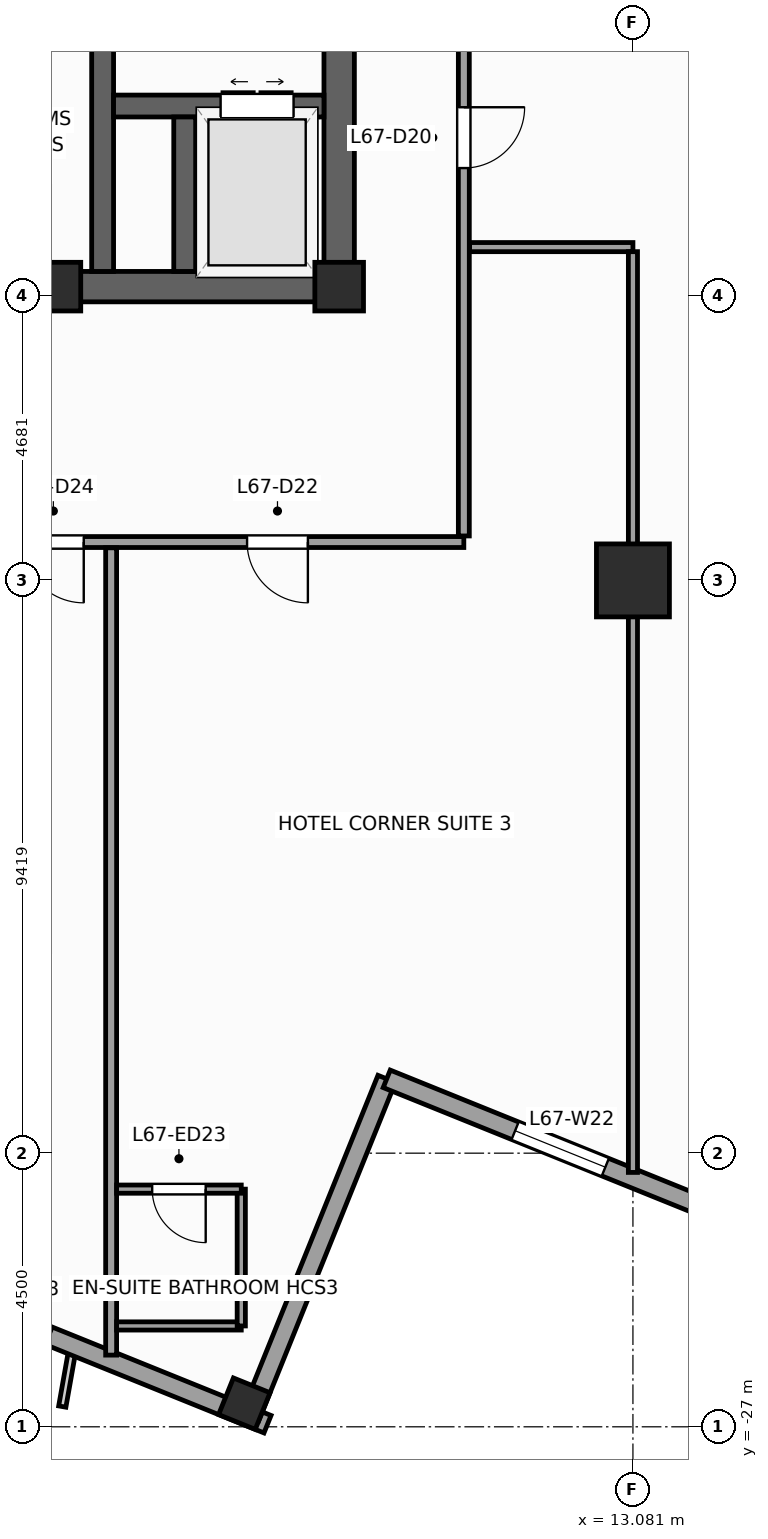
"""IFC4 building model, lengths in metres.
Left out: names, types, materials, properties, quantities, classifications, styles, units other than length and angle.
Written with IfcOpenShell. Run it as: python <this file> out.ifc"""

import sys

from ifc_helpers import new_model, si_unit, direction, frame, frame_2d, origin, origin_2d, place, context, subcontext, project, spatial, rectangle, extrude, source, transform, mapped, element, fill, save


model = new_model("IFC4")
c1 = context("Model", 3, precision=1e-05, world=origin(), true_north=direction((0.0, 1.0)))
c2 = subcontext(c1, "Body", "Model", "MODEL_VIEW")
j1 = project(units=[si_unit("LENGTHUNIT", "METRE"), si_unit("PLANEANGLEUNIT", "RADIAN")], contexts=[c1])
p1 = place(None, origin())
s1 = spatial("IfcSite", under=j1, at=p1, CompositionType="ELEMENT")
p2 = place(p1, origin())
s2 = spatial("IfcBuilding", under=s1, at=p2, CompositionType="ELEMENT")
p3 = place(p2, frame((0.0, 0.0, 276.0)))
s3 = spatial("IfcBuildingStorey", under=s2, at=p3, CompositionType="ELEMENT", Elevation=276.0)
p4 = place(p3, frame((-8.5, -8.25, 0.0), z_axis=(0.0, 0.0, 1.0), x_axis=(1.0, 0.0, 0.0)))
e1 = element("IfcWall", 1, at=p4, inside=s3, PredefinedType="SHEAR", context=c2, shape_type="SweptSolid", body=[
    extrude(rectangle(XDim=17.0, YDim=0.5, at=frame_2d((8.5, 0.0))), origin(), (0.0, 0.0, 1.0), 3.6),
])
p5 = place(p4, frame((7.85, 0.0, 0.0)))
e2 = element("IfcOpeningElement", 2, at=p5, cuts=e1, PredefinedType="OPENING", context=c2, shape_type="SweptSolid", body=[
    extrude(rectangle(XDim=1.3, YDim=2.2, at=frame_2d((0.65, 1.1))), frame((0.0, 0.26, 0.0), z_axis=(0.0, -1.0, 0.0), x_axis=(1.0, 0.0, 0.0)), (0.0, 0.0, 1.0), 0.52),
])
p6 = place(p3, frame((8.25, -8.0, 0.0), z_axis=(0.0, 0.0, 1.0), x_axis=(0.0, 1.0, 0.0)))
e3 = element("IfcWall", 3, at=p6, inside=s3, PredefinedType="SHEAR", context=c2, shape_type="SweptSolid", body=[
    extrude(rectangle(XDim=16.0, YDim=0.5, at=frame_2d((8.0, 0.0))), origin(), (0.0, 0.0, 1.0), 3.6),
])
p7 = place(p6, frame((4.69, 0.0, 0.0)))
e4 = element("IfcOpeningElement", 4, at=p7, cuts=e3, PredefinedType="OPENING", context=c2, shape_type="SweptSolid", body=[
    extrude(rectangle(XDim=1.3, YDim=2.2, at=frame_2d((0.65, 1.1))), frame((0.0, 0.26, 0.0), z_axis=(0.0, -1.0, 0.0), x_axis=(1.0, 0.0, 0.0)), (0.0, 0.0, 1.0), 0.52),
])
p8 = place(p3, frame((4.36, -8.0, 0.0), z_axis=(0.0, 0.0, 1.0), x_axis=(0.0, 1.0, 0.0)))
e5 = element("IfcWall", 5, at=p8, inside=s3, PredefinedType="SHEAR", context=c2, shape_type="SweptSolid", body=[
    extrude(rectangle(XDim=16.0, YDim=0.36, at=frame_2d((8.0, 0.0))), origin(), (0.0, 0.0, 1.0), 3.6),
])
p9 = place(p3, frame((4.54, -5.28, 0.0), z_axis=(0.0, 0.0, 1.0), x_axis=(1.0, 0.0, 0.0)))
e6 = element("IfcWall", 6, at=p9, inside=s3, PredefinedType="SHEAR", context=c2, shape_type="SweptSolid", body=[
    extrude(rectangle(XDim=3.46, YDim=0.36, at=frame_2d((1.73, 0.0))), origin(), (0.0, 0.0, 1.0), 3.6),
])
p10 = place(p9, frame((1.76, 0.0, 0.0)))
e7 = element("IfcOpeningElement", 7, at=p10, cuts=e6, PredefinedType="OPENING", context=c2, shape_type="SweptSolid", body=[
    extrude(rectangle(XDim=1.2, YDim=2.25, at=frame_2d((0.6, 1.125))), frame((0.0, 0.19, 0.0), z_axis=(0.0, -1.0, 0.0), x_axis=(1.0, 0.0, 0.0)), (0.0, 0.0, 1.0), 0.38),
])
p11 = place(p3, frame((5.71, -8.0, 0.0), z_axis=(0.0, 0.0, 1.0), x_axis=(0.0, 1.0, 0.0)))
e8 = element("IfcWall", 8, at=p11, inside=s3, PredefinedType="SHEAR", context=c2, shape_type="SweptSolid", body=[
    extrude(rectangle(XDim=2.54, YDim=0.36, at=frame_2d((1.27, 0.0))), origin(), (0.0, 0.0, 1.0), 3.6),
])
m1 = source(origin(), c2, "Body", "SweptSolid", [
    extrude(rectangle(XDim=0.8, YDim=0.8, at=origin_2d()), origin(), (0.0, 0.0, 1.0), 3.6),
])
for number, where, z_axis, x_axis in (
    (9, (8.25, -8.25, 0.0), (0.0, 0.0, 1.0), (1.0, 0.0, 0.0)),
    (10, (3.6, -8.25, 0.0), (0.0, 0.0, 1.0), (1.0, 0.0, 0.0)),
):
    element("IfcColumn", number, at=place(p3, frame(where, z_axis=z_axis, x_axis=x_axis)), inside=s3, PredefinedType="PILASTER", context=c2, shape_type="MappedRepresentation", body=[
        mapped(m1, transform((0.0, 0.0, 0.0), scale=1.0)),
    ])
m2 = source(origin(), c2, "Body", "SweptSolid", [
    extrude(rectangle(XDim=1.2, YDim=1.2, at=origin_2d()), origin(), (0.0, 0.0, 1.0), 3.6),
])
p12 = place(p3, frame((13.081, -13.081, 0.0), z_axis=(0.0, 0.0, 1.0), x_axis=(1.0, 0.0, 0.0)))
e11 = element("IfcColumn", 11, at=p12, inside=s3, PredefinedType="COLUMN", context=c2, shape_type="MappedRepresentation", body=[
    mapped(m2, transform((0.0, 0.0, 0.0), scale=1.0)),
])
m3 = source(origin(), c2, "Body", "SweptSolid", [
    extrude(rectangle(XDim=0.65, YDim=0.65, at=origin_2d()), origin(), (0.0, 0.0, 1.0), 3.6),
])
p13 = place(p3, frame((6.69, -26.62, 0.0), z_axis=(0.0, 0.0, 1.0), x_axis=(0.374606593416, 0.927183854567, 0.0)))
e12 = element("IfcColumn", 12, at=p13, inside=s3, PredefinedType="COLUMN", context=c2, shape_type="MappedRepresentation", body=[
    mapped(m3, transform((0.0, 0.0, 0.0), scale=1.0)),
])
p14 = place(p3, frame((-23.813, -14.479, 0.0), z_axis=(0.0, 0.0, 1.0), x_axis=(0.927182657188, -0.374609557019, 0.0)))
e13 = element("IfcWall", 13, at=p14, inside=s3, PredefinedType="STANDARD", context=c2, shape_type="SweptSolid", body=[
    extrude(rectangle(XDim=33.31, YDim=0.31, at=frame_2d((16.655, 0.0))), origin(), (0.0, 0.0, 1.0), 2.75),
])
p15 = place(p14, frame((21.73, 0.0, 0.0)))
e14 = element("IfcOpeningElement", 14, at=p15, cuts=e13, PredefinedType="OPENING", context=c2, shape_type="SweptSolid", body=[
    extrude(rectangle(XDim=1.05, YDim=2.25, at=frame_2d((0.525, 1.125))), frame((0.0, 0.165, 0.0), z_axis=(0.0, -1.0, 0.0), x_axis=(1.0, 0.0, 0.0)), (0.0, 0.0, 1.0), 0.33),
])
p16 = place(p14, frame((3.197, 0.0, 0.47)))
e15 = element("IfcOpeningElement", 15, at=p16, cuts=e13, PredefinedType="OPENING", context=c2, shape_type="SweptSolid", body=[
    extrude(rectangle(XDim=1.6, YDim=2.1, at=frame_2d((0.8, 1.05))), frame((0.0, 0.165, 0.0), z_axis=(0.0, -1.0, 0.0), x_axis=(1.0, 0.0, 0.0)), (0.0, 0.0, 1.0), 0.33),
])
p17 = place(p14, frame((8.86, 0.0, 0.47)))
e16 = element("IfcOpeningElement", 16, at=p17, cuts=e13, PredefinedType="OPENING", context=c2, shape_type="SweptSolid", body=[
    extrude(rectangle(XDim=1.6, YDim=2.1, at=frame_2d((0.8, 1.05))), frame((0.0, 0.165, 0.0), z_axis=(0.0, -1.0, 0.0), x_axis=(1.0, 0.0, 0.0)), (0.0, 0.0, 1.0), 0.33),
])
p18 = place(p14, frame((14.439, 0.0, 0.47)))
e17 = element("IfcOpeningElement", 17, at=p18, cuts=e13, PredefinedType="OPENING", context=c2, shape_type="SweptSolid", body=[
    extrude(rectangle(XDim=1.6, YDim=2.1, at=frame_2d((0.8, 1.05))), frame((0.0, 0.165, 0.0), z_axis=(0.0, -1.0, 0.0), x_axis=(1.0, 0.0, 0.0)), (0.0, 0.0, 1.0), 0.33),
])
p19 = place(p14, frame((27.847, 0.0, 0.47)))
e18 = element("IfcOpeningElement", 18, at=p19, cuts=e13, PredefinedType="OPENING", context=c2, shape_type="SweptSolid", body=[
    extrude(rectangle(XDim=1.6, YDim=2.1, at=frame_2d((0.8, 1.05))), frame((0.0, 0.165, 0.0), z_axis=(0.0, -1.0, 0.0), x_axis=(1.0, 0.0, 0.0)), (0.0, 0.0, 1.0), 0.33),
])
p20 = place(p3, frame((6.784, -26.841, 0.0), z_axis=(0.0, 0.0, 1.0), x_axis=(0.374636620962, 0.927171722085, 0.0)))
e19 = element("IfcWall", 19, at=p20, inside=s3, PredefinedType="STANDARD", context=c2, shape_type="SweptSolid", body=[
    extrude(rectangle(XDim=6.0, YDim=0.31, at=frame_2d((3.0, 0.0))), origin(), (0.0, 0.0, 1.0), 2.65),
])
p21 = place(p3, frame((9.032, -21.278, 0.0), z_axis=(0.0, 0.0, 1.0), x_axis=(0.927185411764, -0.374602739196, 0.0)))
e20 = element("IfcWall", 20, at=p21, inside=s3, PredefinedType="STANDARD", context=c2, shape_type="SweptSolid", body=[
    extrude(rectangle(XDim=6.155, YDim=0.31, at=frame_2d((3.078, 0.0))), origin(), (0.0, 0.0, 1.0), 3.35),
])
p22 = place(p21, frame((2.278, 0.0, 0.47)))
e21 = element("IfcOpeningElement", 21, at=p22, cuts=e20, PredefinedType="OPENING", context=c2, shape_type="SweptSolid", body=[
    extrude(rectangle(XDim=1.6, YDim=2.1, at=frame_2d((0.8, 1.05))), frame((0.0, 0.165, 0.0), z_axis=(0.0, -1.0, 0.0), x_axis=(1.0, 0.0, 0.0)), (0.0, 0.0, 1.0), 0.33),
])
p23 = place(p3, frame((-11.45, -12.45, 0.0), z_axis=(0.0, 0.0, 1.0), x_axis=(1.0, 0.0, 0.0)))
e22 = element("IfcWall", 22, at=p23, inside=s3, PredefinedType="PARTITIONING", context=c2, shape_type="SweptSolid", body=[
    extrude(rectangle(XDim=21.75, YDim=0.18, at=frame_2d((10.875, 0.0))), origin(), (0.0, 0.0, 1.0), 3.35),
])
p24 = place(p23, frame((12.436, 0.0, 0.0)))
e23 = element("IfcOpeningElement", 23, at=p24, cuts=e22, PredefinedType="OPENING", context=c2, shape_type="SweptSolid", body=[
    extrude(rectangle(XDim=0.95, YDim=2.1, at=frame_2d((0.475, 1.05))), frame((0.0, 0.1, 0.0), z_axis=(0.0, -1.0, 0.0), x_axis=(1.0, 0.0, 0.0)), (0.0, 0.0, 1.0), 0.2),
])
p25 = place(p23, frame((18.186, 0.0, 0.0)))
e24 = element("IfcOpeningElement", 24, at=p25, cuts=e22, PredefinedType="OPENING", context=c2, shape_type="SweptSolid", body=[
    extrude(rectangle(XDim=1.0, YDim=2.15, at=frame_2d((0.5, 1.075))), frame((0.0, 0.1, 0.0), z_axis=(0.0, -1.0, 0.0), x_axis=(1.0, 0.0, 0.0)), (0.0, 0.0, 1.0), 0.2),
])
p26 = place(p23, frame((14.5, 0.0, 0.0)))
e25 = element("IfcOpeningElement", 25, at=p26, cuts=e22, PredefinedType="OPENING", context=c2, shape_type="SweptSolid", body=[
    extrude(rectangle(XDim=1.0, YDim=2.15, at=frame_2d((0.5, 1.075))), frame((0.0, 0.1, 0.0), z_axis=(0.0, -1.0, 0.0), x_axis=(1.0, 0.0, 0.0)), (0.0, 0.0, 1.0), 0.2),
])
p27 = place(p23, frame((8.7, 0.0, 0.0)))
e26 = element("IfcOpeningElement", 26, at=p27, cuts=e22, PredefinedType="OPENING", context=c2, shape_type="SweptSolid", body=[
    extrude(rectangle(XDim=1.0, YDim=2.15, at=frame_2d((0.5, 1.075))), frame((0.0, 0.1, 0.0), z_axis=(0.0, -1.0, 0.0), x_axis=(1.0, 0.0, 0.0)), (0.0, 0.0, 1.0), 0.2),
])
p28 = place(p23, frame((3.139, 0.0, 0.0)))
e27 = element("IfcOpeningElement", 27, at=p28, cuts=e22, PredefinedType="OPENING", context=c2, shape_type="SweptSolid", body=[
    extrude(rectangle(XDim=1.0, YDim=2.15, at=frame_2d((0.5, 1.075))), frame((0.0, 0.1, 0.0), z_axis=(0.0, -1.0, 0.0), x_axis=(1.0, 0.0, 0.0)), (0.0, 0.0, 1.0), 0.2),
])
p29 = place(p3, frame((10.3, -12.35, 0.0), z_axis=(0.0, 0.0, 1.0), x_axis=(0.0, 1.0, 0.0)))
e28 = element("IfcWall", 28, at=p29, inside=s3, PredefinedType="PARTITIONING", context=c2, shape_type="SweptSolid", body=[
    extrude(rectangle(XDim=23.7, YDim=0.18, at=frame_2d((11.85, 0.0))), origin(), (0.0, 0.0, 1.0), 3.35),
])
p30 = place(p29, frame((17.65, 0.0, 0.0)))
e29 = element("IfcOpeningElement", 29, at=p30, cuts=e28, PredefinedType="OPENING", context=c2, shape_type="SweptSolid", body=[
    extrude(rectangle(XDim=1.0, YDim=2.15, at=frame_2d((0.5, 1.075))), frame((0.0, 0.1, 0.0), z_axis=(0.0, -1.0, 0.0), x_axis=(1.0, 0.0, 0.0)), (0.0, 0.0, 1.0), 0.2),
])
p31 = place(p29, frame((13.85, 0.0, 0.0)))
e30 = element("IfcOpeningElement", 30, at=p31, cuts=e28, PredefinedType="OPENING", context=c2, shape_type="SweptSolid", body=[
    extrude(rectangle(XDim=1.0, YDim=2.15, at=frame_2d((0.5, 1.075))), frame((0.0, 0.1, 0.0), z_axis=(0.0, -1.0, 0.0), x_axis=(1.0, 0.0, 0.0)), (0.0, 0.0, 1.0), 0.2),
])
p32 = place(p29, frame((9.85, 0.0, 0.0)))
e31 = element("IfcOpeningElement", 31, at=p32, cuts=e28, PredefinedType="OPENING", context=c2, shape_type="SweptSolid", body=[
    extrude(rectangle(XDim=1.0, YDim=2.15, at=frame_2d((0.5, 1.075))), frame((0.0, 0.1, 0.0), z_axis=(0.0, -1.0, 0.0), x_axis=(1.0, 0.0, 0.0)), (0.0, 0.0, 1.0), 0.2),
])
p33 = place(p29, frame((6.05, 0.0, 0.0)))
e32 = element("IfcOpeningElement", 32, at=p33, cuts=e28, PredefinedType="OPENING", context=c2, shape_type="SweptSolid", body=[
    extrude(rectangle(XDim=1.0, YDim=2.15, at=frame_2d((0.5, 1.075))), frame((0.0, 0.1, 0.0), z_axis=(0.0, -1.0, 0.0), x_axis=(1.0, 0.0, 0.0)), (0.0, 0.0, 1.0), 0.2),
])
p34 = place(p3, frame((4.5, -12.545, 0.0), z_axis=(0.0, 0.0, 1.0), x_axis=(0.0, -1.0, 0.0)))
e33 = element("IfcWall", 33, at=p34, inside=s3, PredefinedType="PARTITIONING", context=c2, shape_type="SweptSolid", body=[
    extrude(rectangle(XDim=13.276, YDim=0.18, at=frame_2d((6.638, 0.0))), origin(), (0.0, 0.0, 1.0), 3.35),
])
p35 = place(p3, frame((10.395, -7.6, 0.0), z_axis=(0.0, 0.0, 1.0), x_axis=(1.0, 0.0, 0.0)))
e34 = element("IfcWall", 34, at=p35, inside=s3, PredefinedType="PARTITIONING", context=c2, shape_type="SweptSolid", body=[
    extrude(rectangle(XDim=2.686, YDim=0.15, at=frame_2d((1.343, 0.0))), origin(), (0.0, 0.0, 1.0), 3.35),
])
p36 = place(p3, frame((13.081, -7.675, 0.0), z_axis=(0.0, 0.0, 1.0), x_axis=(0.0, -1.0, 0.0)))
e35 = element("IfcWall", 35, at=p36, inside=s3, PredefinedType="PARTITIONING", context=c2, shape_type="SweptSolid", body=[
    extrude(rectangle(XDim=15.142, YDim=0.15, at=frame_2d((7.571, 0.0))), origin(), (0.0, 0.0, 1.0), 2.45),
])
p37 = place(p3, frame((4.59, -25.342, 0.0), z_axis=(0.0, 0.0, 1.0), x_axis=(1.0, 0.0, 0.0)))
e36 = element("IfcWall", 36, at=p37, inside=s3, PredefinedType="PARTITIONING", context=c2, shape_type="SweptSolid", body=[
    extrude(rectangle(XDim=2.05, YDim=0.135, at=frame_2d((1.025, 0.0))), origin(), (0.0, 0.0, 1.0), 3.35),
])
p38 = place(p3, frame((6.64, -25.342, 0.0), z_axis=(0.0, 0.0, 1.0), x_axis=(0.0, 1.0, 0.0)))
e37 = element("IfcWall", 37, at=p38, inside=s3, PredefinedType="PARTITIONING", context=c2, shape_type="SweptSolid", body=[
    extrude(rectangle(XDim=2.25, YDim=0.135, at=frame_2d((1.125, 0.0))), origin(), (0.0, 0.0, 1.0), 3.35),
])
p39 = place(p3, frame((4.59, -23.092, 0.0), z_axis=(0.0, 0.0, 1.0), x_axis=(1.0, 0.0, 0.0)))
e38 = element("IfcWall", 38, at=p39, inside=s3, PredefinedType="PARTITIONING", context=c2, shape_type="SweptSolid", body=[
    extrude(rectangle(XDim=2.05, YDim=0.135, at=frame_2d((1.025, 0.0))), origin(), (0.0, 0.0, 1.0), 3.35),
])
p40 = place(p39, frame((0.585, 0.0, 0.0)))
e39 = element("IfcOpeningElement", 39, at=p40, cuts=e38, PredefinedType="OPENING", context=c2, shape_type="SweptSolid", body=[
    extrude(rectangle(XDim=0.88, YDim=2.1, at=frame_2d((0.44, 1.05))), frame((0.0, 0.078, 0.0), z_axis=(0.0, -1.0, 0.0), x_axis=(1.0, 0.0, 0.0)), (0.0, 0.0, 1.0), 0.155),
])
m4 = source(origin(), c2, "Body", "SweptSolid", [
    extrude(rectangle(XDim=1.6, YDim=2.1, at=frame_2d((0.8, 1.05))), frame((0.0, 0.03, 0.0), z_axis=(0.0, -1.0, 0.0), x_axis=(1.0, 0.0, 0.0)), (0.0, 0.0, 1.0), 0.06),
])
p41 = place(p22, origin())
e40 = element("IfcWindow", 40, at=p41, inside=s3, PartitioningType="SINGLE_PANEL", PredefinedType="WINDOW", context=c2, shape_type="MappedRepresentation", body=[
    mapped(m4, transform((0.0, 0.0, 0.0), scale=1.0)),
])
fill(e21, e40)
m5 = source(origin(), c2, "Body", "SweptSolid", [
    extrude(rectangle(XDim=1.2, YDim=2.25, at=frame_2d((0.6, 1.125))), frame((0.0, 0.025, 0.0), z_axis=(0.0, -1.0, 0.0), x_axis=(1.0, 0.0, 0.0)), (0.0, 0.0, 1.0), 0.05),
])
p42 = place(p10, origin())
e41 = element("IfcDoor", 41, at=p42, inside=s3, OperationType="DOUBLE_DOOR_SLIDING", PredefinedType="DOOR", context=c2, shape_type="MappedRepresentation", body=[
    mapped(m5, transform((0.0, 0.0, 0.0), scale=1.0)),
])
fill(e7, e41)
m6 = source(origin(), c2, "Body", "SweptSolid", [
    extrude(rectangle(XDim=1.0, YDim=2.15, at=frame_2d((0.5, 1.075))), frame((0.0, 0.025, 0.0), z_axis=(0.0, -1.0, 0.0), x_axis=(1.0, 0.0, 0.0)), (0.0, 0.0, 1.0), 0.05),
])
p43 = place(p33, frame((1.0, 0.0, 0.0), z_axis=(0.0, 0.0, 1.0), x_axis=(-1.0, 0.0, 0.0)))
e42 = element("IfcDoor", 42, at=p43, inside=s3, OperationType="SINGLE_SWING_RIGHT", PredefinedType="DOOR", context=c2, shape_type="MappedRepresentation", body=[
    mapped(m6, transform((0.0, 0.0, 0.0), scale=1.0)),
])
fill(e32, e42)
p44 = place(p25, frame((1.0, 0.0, 0.0), z_axis=(0.0, 0.0, 1.0), x_axis=(-1.0, 0.0, 0.0)))
e43 = element("IfcDoor", 43, at=p44, inside=s3, OperationType="SINGLE_SWING_RIGHT", PredefinedType="DOOR", context=c2, shape_type="MappedRepresentation", body=[
    mapped(m6, transform((0.0, 0.0, 0.0), scale=1.0)),
])
fill(e24, e43)
m7 = source(origin(), c2, "Body", "SweptSolid", [
    extrude(rectangle(XDim=0.88, YDim=2.1, at=frame_2d((0.44, 1.05))), frame((0.0, 0.025, 0.0), z_axis=(0.0, -1.0, 0.0), x_axis=(1.0, 0.0, 0.0)), (0.0, 0.0, 1.0), 0.05),
])
p45 = place(p40, frame((0.88, 0.0, 0.0), z_axis=(0.0, 0.0, 1.0), x_axis=(-1.0, 0.0, 0.0)))
e44 = element("IfcDoor", 44, at=p45, inside=s3, OperationType="SINGLE_SWING_RIGHT", PredefinedType="DOOR", context=c2, shape_type="MappedRepresentation", body=[
    mapped(m7, transform((0.0, 0.0, 0.0), scale=1.0)),
])
fill(e39, e44)
p46 = place(p26, frame((1.0, 0.0, 0.0), z_axis=(0.0, 0.0, 1.0), x_axis=(-1.0, 0.0, 0.0)))
e45 = element("IfcDoor", 45, at=p46, inside=s3, OperationType="SINGLE_SWING_RIGHT", PredefinedType="DOOR", context=c2, shape_type="MappedRepresentation", body=[
    mapped(m6, transform((0.0, 0.0, 0.0), scale=1.0)),
])
fill(e25, e45)
save(model, sys.argv[1])
